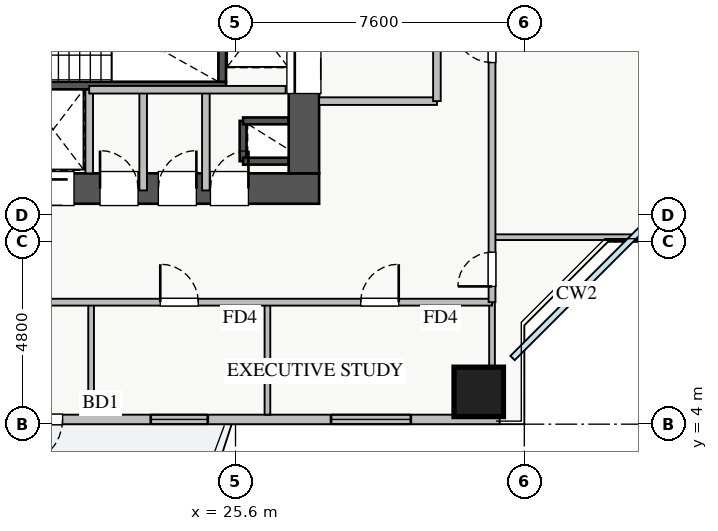
"""IFC4 building model, lengths in metres.
Left out: names, types, materials, properties, quantities, classifications, styles, units other than length and angle.
Written with IfcOpenShell. Run it as: python <this file> out.ifc"""

import sys

from ifc_helpers import new_model, si_unit, direction, frame, frame_2d, origin, origin_2d, place, context, subcontext, project, spatial, rectangle, extrude, source, transform, mapped, element, fill, save


model = new_model("IFC4")
c1 = context("Model", 3, precision=1e-05, world=origin(), true_north=direction((0.0, 1.0)))
c2 = subcontext(c1, "Body", "Model", "MODEL_VIEW")
j1 = project(units=[si_unit("LENGTHUNIT", "METRE"), si_unit("PLANEANGLEUNIT", "RADIAN")], contexts=[c1])
p1 = place(None, origin())
s1 = spatial("IfcSite", under=j1, at=p1, CompositionType="ELEMENT")
p2 = place(p1, origin())
s2 = spatial("IfcBuilding", under=s1, at=p2, CompositionType="ELEMENT")
p3 = place(p2, frame((0.0, 0.0, 42.5)))
s3 = spatial("IfcBuildingStorey", under=s2, at=p3, CompositionType="ELEMENT", Elevation=42.5)
p4 = place(p3, frame((25.8, 10.92, 0.0), z_axis=(0.0, 0.0, 1.0), x_axis=(0.0, 1.0, 0.0)))
e1 = element("IfcWall", 1, at=p4, inside=s3, PredefinedType="SHEAR", context=c2, shape_type="SweptSolid", body=[
    extrude(rectangle(XDim=1.06, YDim=0.18, at=frame_2d((0.53, 0.0))), origin(), (0.0, 0.0, 1.0), 3.03),
])
for number, where, z_axis, x_axis in (
    (2, (25.8, 11.98, 0.0), (0.0, 0.0, 1.0), (1.0, 0.0, 0.0)),
    (3, (25.8, 10.92, 0.0), (0.0, 0.0, 1.0), (1.0, 0.0, 0.0)),
):
    element("IfcWall", number, at=place(p3, frame(where, z_axis=z_axis, x_axis=x_axis)), inside=s3, PredefinedType="SHEAR", context=c2, shape_type="SweptSolid", body=[
        extrude(rectangle(XDim=1.2, YDim=0.18, at=frame_2d((0.6, 0.0))), origin(), (0.0, 0.0, 1.0), 3.03),
    ])
p5 = place(p3, frame((19.88, 12.8, 0.0), z_axis=(0.0, 0.0, 1.0), x_axis=(1.0, 0.0, 0.0)))
e4 = element("IfcWall", 4, at=p5, inside=s3, PredefinedType="SHEAR", context=c2, shape_type="SweptSolid", body=[
    extrude(rectangle(XDim=1.87, YDim=0.18, at=frame_2d((0.935, 0.0))), origin(), (0.0, 0.0, 1.0), 3.03),
])
p6 = place(p3, frame((18.2, 12.91, 0.0), z_axis=(0.0, 0.0, 1.0), x_axis=(1.0, 0.0, 0.0)))
e5 = element("IfcWall", 5, at=p6, inside=s3, PredefinedType="SHEAR", context=c2, shape_type="SweptSolid", body=[
    extrude(rectangle(XDim=7.15, YDim=0.2, at=frame_2d((3.575, 0.0))), origin(), (0.0, 0.0, 1.0), 3.25),
])
p7 = place(p6, frame((0.35, 0.0, 0.0)))
e6 = element("IfcOpeningElement", 6, at=p7, cuts=e5, PredefinedType="OPENING", context=c2, shape_type="SweptSolid", body=[
    extrude(rectangle(XDim=1.1, YDim=2.05, at=frame_2d((0.55, 1.025))), frame((0.0, 0.11, 0.0), z_axis=(0.0, -1.0, 0.0), x_axis=(1.0, 0.0, 0.0)), (0.0, 0.0, 1.0), 0.22),
])
p8 = place(p3, frame((25.25, 13.01, 0.0), z_axis=(0.0, 0.0, 1.0), x_axis=(0.0, 1.0, 0.0)))
e7 = element("IfcWall", 7, at=p8, inside=s3, PredefinedType="SHEAR", context=c2, shape_type="SweptSolid", body=[
    extrude(rectangle(XDim=2.94, YDim=0.2, at=frame_2d((1.47, 0.0))), origin(), (0.0, 0.0, 1.0), 3.25),
])
p9 = place(p3, frame((10.2, 10.2, 0.0), z_axis=(0.0, 0.0, 1.0), x_axis=(1.0, 0.0, 0.0)))
e8 = element("IfcWall", 8, at=p9, inside=s3, PredefinedType="SHEAR", context=c2, shape_type="SweptSolid", body=[
    extrude(rectangle(XDim=17.6, YDim=0.8, at=frame_2d((8.8, 0.0))), origin(), (0.0, 0.0, 1.0), 3.25),
])
p10 = place(p9, frame((1.15, 0.0, 0.0)))
e9 = element("IfcOpeningElement", 9, at=p10, cuts=e8, PredefinedType="OPENING", context=c2, shape_type="SweptSolid", body=[
    extrude(rectangle(XDim=1.1, YDim=2.05, at=frame_2d((0.55, 1.025))), frame((0.0, 0.41, 0.0), z_axis=(0.0, -1.0, 0.0), x_axis=(1.0, 0.0, 0.0)), (0.0, 0.0, 1.0), 0.82),
])
p11 = place(p9, frame((8.3, 0.0, 0.0)))
e10 = element("IfcOpeningElement", 10, at=p11, cuts=e8, PredefinedType="OPENING", context=c2, shape_type="SweptSolid", body=[
    extrude(rectangle(XDim=1.1, YDim=2.05, at=frame_2d((0.55, 1.025))), frame((0.0, 0.41, 0.0), z_axis=(0.0, -1.0, 0.0), x_axis=(1.0, 0.0, 0.0)), (0.0, 0.0, 1.0), 0.82),
])
p12 = place(p9, frame((10.05, 0.0, 0.0)))
e11 = element("IfcOpeningElement", 11, at=p12, cuts=e8, PredefinedType="OPENING", context=c2, shape_type="SweptSolid", body=[
    extrude(rectangle(XDim=1.1, YDim=2.05, at=frame_2d((0.55, 1.025))), frame((0.0, 0.41, 0.0), z_axis=(0.0, -1.0, 0.0), x_axis=(1.0, 0.0, 0.0)), (0.0, 0.0, 1.0), 0.82),
])
p13 = place(p9, frame((14.74, 0.0, 0.0)))
e12 = element("IfcOpeningElement", 12, at=p13, cuts=e8, PredefinedType="OPENING", context=c2, shape_type="SweptSolid", body=[
    extrude(rectangle(XDim=1.0, YDim=2.05, at=frame_2d((0.5, 1.025))), frame((0.0, 0.41, 0.0), z_axis=(0.0, -1.0, 0.0), x_axis=(1.0, 0.0, 0.0)), (0.0, 0.0, 1.0), 0.82),
])
p14 = place(p9, frame((11.835, 0.0, 0.0)))
e13 = element("IfcOpeningElement", 13, at=p14, cuts=e8, PredefinedType="OPENING", context=c2, shape_type="SweptSolid", body=[
    extrude(rectangle(XDim=1.0, YDim=2.05, at=frame_2d((0.5, 1.025))), frame((0.0, 0.41, 0.0), z_axis=(0.0, -1.0, 0.0), x_axis=(1.0, 0.0, 0.0)), (0.0, 0.0, 1.0), 0.82),
])
p15 = place(p9, frame((13.37, 0.0, 0.0)))
e14 = element("IfcOpeningElement", 14, at=p15, cuts=e8, PredefinedType="OPENING", context=c2, shape_type="SweptSolid", body=[
    extrude(rectangle(XDim=1.0, YDim=2.05, at=frame_2d((0.5, 1.025))), frame((0.0, 0.41, 0.0), z_axis=(0.0, -1.0, 0.0), x_axis=(1.0, 0.0, 0.0)), (0.0, 0.0, 1.0), 0.82),
])
p16 = place(p3, frame((27.4, 10.6, 0.0), z_axis=(0.0, 0.0, 1.0), x_axis=(0.0, 1.0, 0.0)))
e15 = element("IfcWall", 15, at=p16, inside=s3, PredefinedType="SHEAR", context=c2, shape_type="SweptSolid", body=[
    extrude(rectangle(XDim=5.6, YDim=0.8, at=frame_2d((2.8, 0.0))), origin(), (0.0, 0.0, 1.0), 3.25),
])
p17 = place(p16, frame((2.1, 0.0, 0.0)))
e16 = element("IfcOpeningElement", 16, at=p17, cuts=e15, PredefinedType="OPENING", context=c2, shape_type="SweptSolid", body=[
    extrude(rectangle(XDim=1.3, YDim=2.05, at=frame_2d((0.65, 1.025))), frame((0.0, 0.41, 0.0), z_axis=(0.0, -1.0, 0.0), x_axis=(1.0, 0.0, 0.0)), (0.0, 0.0, 1.0), 0.82),
])
m1 = source(origin(), c2, "Body", "SweptSolid", [
    extrude(rectangle(XDim=1.3, YDim=1.3, at=origin_2d()), origin(), (0.0, 0.0, 1.0), 3.25),
])
p18 = place(p3, frame((32.0, 4.85, 0.0), z_axis=(0.0, 0.0, 1.0), x_axis=(1.0, 0.0, 0.0)))
e17 = element("IfcColumn", 17, at=p18, inside=s3, PredefinedType="COLUMN", context=c2, shape_type="MappedRepresentation", body=[
    mapped(m1, transform((0.0, 0.0, 0.0), x_axis=(1.0, 0.0, 0.0), y_axis=(0.0, 1.0, 0.0), z_axis=(0.0, 0.0, 1.0), scale=1.0)),
])
p19 = place(p3, frame((5.45, 4.125, 0.0), z_axis=(0.0, 0.0, 1.0), x_axis=(1.0, 0.0, 0.0)))
e18 = element("IfcWall", 18, at=p19, inside=s3, PredefinedType="STANDARD", context=c2, shape_type="SweptSolid", body=[
    extrude(rectangle(XDim=27.1, YDim=0.25, at=frame_2d((13.55, 0.0))), origin(), (0.0, 0.0, 1.0), 2.57),
])
p20 = place(p19, frame((14.4, 0.0, 0.0)))
e19 = element("IfcOpeningElement", 19, at=p20, cuts=e18, PredefinedType="OPENING", context=c2, shape_type="SweptSolid", body=[
    extrude(rectangle(XDim=1.2, YDim=2.1, at=frame_2d((0.6, 1.05))), frame((0.0, 0.135, 0.0), z_axis=(0.0, -1.0, 0.0), x_axis=(1.0, 0.0, 0.0)), (0.0, 0.0, 1.0), 0.27),
])
p21 = place(p19, frame((1.45, 0.0, 0.9)))
e20 = element("IfcOpeningElement", 20, at=p21, cuts=e18, PredefinedType="OPENING", context=c2, shape_type="SweptSolid", body=[
    extrude(rectangle(XDim=1.5, YDim=1.5, at=frame_2d((0.75, 0.75))), frame((0.0, 0.135, 0.0), z_axis=(0.0, -1.0, 0.0), x_axis=(1.0, 0.0, 0.0)), (0.0, 0.0, 1.0), 0.27),
])
p22 = place(p19, frame((9.263, 0.0, 0.9)))
e21 = element("IfcOpeningElement", 21, at=p22, cuts=e18, PredefinedType="OPENING", context=c2, shape_type="SweptSolid", body=[
    extrude(rectangle(XDim=1.8, YDim=1.45, at=frame_2d((0.9, 0.725))), frame((0.0, 0.135, 0.0), z_axis=(0.0, -1.0, 0.0), x_axis=(1.0, 0.0, 0.0)), (0.0, 0.0, 1.0), 0.27),
])
p23 = place(p19, frame((17.92, 0.0, 0.9)))
e22 = element("IfcOpeningElement", 22, at=p23, cuts=e18, PredefinedType="OPENING", context=c2, shape_type="SweptSolid", body=[
    extrude(rectangle(XDim=1.5, YDim=1.5, at=frame_2d((0.75, 0.75))), frame((0.0, 0.135, 0.0), z_axis=(0.0, -1.0, 0.0), x_axis=(1.0, 0.0, 0.0)), (0.0, 0.0, 1.0), 0.27),
])
p24 = place(p19, frame((22.663, 0.0, 0.9)))
e23 = element("IfcOpeningElement", 23, at=p24, cuts=e18, PredefinedType="OPENING", context=c2, shape_type="SweptSolid", body=[
    extrude(rectangle(XDim=2.1, YDim=1.48, at=frame_2d((1.05, 0.74))), frame((0.0, 0.135, 0.0), z_axis=(0.0, -1.0, 0.0), x_axis=(1.0, 0.0, 0.0)), (0.0, 0.0, 1.0), 0.27),
])
p25 = place(p19, frame((4.62, 0.0, 0.9)))
e24 = element("IfcOpeningElement", 24, at=p25, cuts=e18, PredefinedType="OPENING", context=c2, shape_type="SweptSolid", body=[
    extrude(rectangle(XDim=2.4, YDim=1.5, at=frame_2d((1.2, 0.75))), frame((0.0, 0.135, 0.0), z_axis=(0.0, -1.0, 0.0), x_axis=(1.0, 0.0, 0.0)), (0.0, 0.0, 1.0), 0.27),
])
p26 = place(p3, frame((27.8, 12.5, 0.0), z_axis=(0.0, 0.0, 1.0), x_axis=(1.0, 0.0, 0.0)))
e25 = element("IfcWall", 25, at=p26, inside=s3, PredefinedType="PARTITIONING", context=c2, shape_type="SweptSolid", body=[
    extrude(rectangle(XDim=3.1, YDim=0.2, at=frame_2d((1.55, 0.0))), origin(), (0.0, 0.0, 1.0), 3.03),
])
p27 = place(p3, frame((30.9, 12.5, 0.0), z_axis=(0.0, 0.0, 1.0), x_axis=(0.0, 1.0, 0.0)))
e26 = element("IfcWall", 26, at=p27, inside=s3, PredefinedType="PARTITIONING", context=c2, shape_type="SweptSolid", body=[
    extrude(rectangle(XDim=3.9, YDim=0.2, at=frame_2d((1.95, 0.0))), origin(), (0.0, 0.0, 1.0), 3.03),
])
p28 = place(p27, frame((1.4, 0.0, 0.0)))
e27 = element("IfcOpeningElement", 27, at=p28, cuts=e26, PredefinedType="OPENING", context=c2, shape_type="SweptSolid", body=[
    extrude(rectangle(XDim=1.1, YDim=2.05, at=frame_2d((0.55, 1.025))), frame((0.0, 0.11, 0.0), z_axis=(0.0, -1.0, 0.0), x_axis=(1.0, 0.0, 0.0)), (0.0, 0.0, 1.0), 0.22),
])
p29 = place(p3, frame((24.82, 10.15, 0.0), z_axis=(0.0, 0.0, 1.0), x_axis=(0.0, 1.0, 0.0)))
e28 = element("IfcWall", 28, at=p29, inside=s3, PredefinedType="PARTITIONING", context=c2, shape_type="SweptSolid", body=[
    extrude(rectangle(XDim=2.65, YDim=0.2, at=frame_2d((1.325, 0.0))), origin(), (0.0, 0.0, 1.0), 3.03),
])
p30 = place(p3, frame((21.75, 10.6, 0.0), z_axis=(0.0, 0.0, 1.0), x_axis=(0.0, 1.0, 0.0)))
e29 = element("IfcWall", 29, at=p30, inside=s3, PredefinedType="PARTITIONING", context=c2, shape_type="SweptSolid", body=[
    extrude(rectangle(XDim=2.2, YDim=0.2, at=frame_2d((1.1, 0.0))), origin(), (0.0, 0.0, 1.0), 3.03),
])
p31 = place(p3, frame((23.17, 10.15, 0.0), z_axis=(0.0, 0.0, 1.0), x_axis=(0.0, 1.0, 0.0)))
e30 = element("IfcWall", 30, at=p31, inside=s3, PredefinedType="PARTITIONING", context=c2, shape_type="SweptSolid", body=[
    extrude(rectangle(XDim=2.65, YDim=0.2, at=frame_2d((1.325, 0.0))), origin(), (0.0, 0.0, 1.0), 3.03),
])
p32 = place(p3, frame((21.75, 12.8, 0.0), z_axis=(0.0, 0.0, 1.0), x_axis=(1.0, 0.0, 0.0)))
e31 = element("IfcWall", 31, at=p32, inside=s3, PredefinedType="PARTITIONING", context=c2, shape_type="SweptSolid", body=[
    extrude(rectangle(XDim=5.17, YDim=0.2, at=frame_2d((2.585, 0.0))), origin(), (0.0, 0.0, 1.0), 3.03),
])
for number, where, z_axis, x_axis in (
    (32, (21.8, 4.25, 0.0), (0.0, 0.0, 1.0), (0.0, 1.0, 0.0)),
    (33, (26.44, 4.25, 0.0), (0.0, 0.0, 1.0), (0.0, 1.0, 0.0)),
    (34, (32.35, 4.25, 0.0), (0.0, 0.0, 1.0), (0.0, 1.0, 0.0)),
):
    element("IfcWall", number, at=place(p3, frame(where, z_axis=z_axis, x_axis=x_axis)), inside=s3, PredefinedType="PARTITIONING", context=c2, shape_type="SweptSolid", body=[
        extrude(rectangle(XDim=2.96, YDim=0.15, at=frame_2d((1.48, 0.0))), origin(), (0.0, 0.0, 1.0), 3.03),
    ])
p33 = place(p3, frame((8.72, 7.21, 0.0), z_axis=(0.0, 0.0, 1.0), x_axis=(1.0, 0.0, 0.0)))
e35 = element("IfcWall", 35, at=p33, inside=s3, PredefinedType="PARTITIONING", context=c2, shape_type="SweptSolid", body=[
    extrude(rectangle(XDim=23.63, YDim=0.18, at=frame_2d((11.815, 0.0))), origin(), (0.0, 0.0, 1.0), 3.03),
])
p34 = place(p33, frame((2.05, 0.0, 0.0)))
e36 = element("IfcOpeningElement", 36, at=p34, cuts=e35, PredefinedType="OPENING", context=c2, shape_type="SweptSolid", body=[
    extrude(rectangle(XDim=1.0, YDim=2.05, at=frame_2d((0.5, 1.025))), frame((0.0, 0.1, 0.0), z_axis=(0.0, -1.0, 0.0), x_axis=(1.0, 0.0, 0.0)), (0.0, 0.0, 1.0), 0.2),
])
p35 = place(p33, frame((8.59, 0.0, 0.0)))
e37 = element("IfcOpeningElement", 37, at=p35, cuts=e35, PredefinedType="OPENING", context=c2, shape_type="SweptSolid", body=[
    extrude(rectangle(XDim=1.0, YDim=2.05, at=frame_2d((0.5, 1.025))), frame((0.0, 0.1, 0.0), z_axis=(0.0, -1.0, 0.0), x_axis=(1.0, 0.0, 0.0)), (0.0, 0.0, 1.0), 0.2),
])
p36 = place(p33, frame((14.9, 0.0, 0.0)))
e38 = element("IfcOpeningElement", 38, at=p36, cuts=e35, PredefinedType="OPENING", context=c2, shape_type="SweptSolid", body=[
    extrude(rectangle(XDim=1.0, YDim=2.05, at=frame_2d((0.5, 1.025))), frame((0.0, 0.1, 0.0), z_axis=(0.0, -1.0, 0.0), x_axis=(1.0, 0.0, 0.0)), (0.0, 0.0, 1.0), 0.2),
])
p37 = place(p33, frame((20.175, 0.0, 0.0)))
e39 = element("IfcOpeningElement", 39, at=p37, cuts=e35, PredefinedType="OPENING", context=c2, shape_type="SweptSolid", body=[
    extrude(rectangle(XDim=1.0, YDim=2.05, at=frame_2d((0.5, 1.025))), frame((0.0, 0.1, 0.0), z_axis=(0.0, -1.0, 0.0), x_axis=(1.0, 0.0, 0.0)), (0.0, 0.0, 1.0), 0.2),
])
p38 = place(p3, frame((32.35, 8.92, 0.0), z_axis=(0.0, 0.0, 1.0), x_axis=(1.0, 0.0, 0.0)))
e40 = element("IfcWall", 40, at=p38, inside=s3, PredefinedType="PARTITIONING", context=c2, shape_type="SweptSolid", body=[
    extrude(rectangle(XDim=5.4, YDim=0.15, at=frame_2d((2.7, 0.0))), origin(), (0.0, 0.0, 1.0), 3.03),
])
p39 = place(p3, frame((32.35, 7.21, 0.0), z_axis=(0.0, 0.0, 1.0), x_axis=(0.0, 1.0, 0.0)))
e41 = element("IfcWall", 41, at=p39, inside=s3, PredefinedType="PARTITIONING", context=c2, shape_type="SweptSolid", body=[
    extrude(rectangle(XDim=31.23, YDim=0.18, at=frame_2d((15.615, 0.0))), origin(), (0.0, 0.0, 1.0), 2.825),
])
p40 = place(p39, frame((30.09, 0.0, 0.0)))
e42 = element("IfcOpeningElement", 42, at=p40, cuts=e41, PredefinedType="OPENING", context=c2, shape_type="SweptSolid", body=[
    extrude(rectangle(XDim=0.9, YDim=2.05, at=frame_2d((0.45, 1.025))), frame((0.0, 0.1, 0.0), z_axis=(0.0, -1.0, 0.0), x_axis=(1.0, 0.0, 0.0)), (0.0, 0.0, 1.0), 0.2),
])
p41 = place(p39, frame((0.415, 0.0, 0.0)))
e43 = element("IfcOpeningElement", 43, at=p41, cuts=e41, PredefinedType="OPENING", context=c2, shape_type="SweptSolid", body=[
    extrude(rectangle(XDim=0.9, YDim=2.05, at=frame_2d((0.45, 1.025))), frame((0.0, 0.1, 0.0), z_axis=(0.0, -1.0, 0.0), x_axis=(1.0, 0.0, 0.0)), (0.0, 0.0, 1.0), 0.2),
])
p42 = place(p39, frame((6.305, 0.0, 0.0)))
e44 = element("IfcOpeningElement", 44, at=p42, cuts=e41, PredefinedType="OPENING", context=c2, shape_type="SweptSolid", body=[
    extrude(rectangle(XDim=1.0, YDim=2.05, at=frame_2d((0.5, 1.025))), frame((0.0, 0.1, 0.0), z_axis=(0.0, -1.0, 0.0), x_axis=(1.0, 0.0, 0.0)), (0.0, 0.0, 1.0), 0.2),
])
p43 = place(p39, frame((13.205, 0.0, 0.0)))
e45 = element("IfcOpeningElement", 45, at=p43, cuts=e41, PredefinedType="OPENING", context=c2, shape_type="SweptSolid", body=[
    extrude(rectangle(XDim=1.0, YDim=2.05, at=frame_2d((0.5, 1.025))), frame((0.0, 0.1, 0.0), z_axis=(0.0, -1.0, 0.0), x_axis=(1.0, 0.0, 0.0)), (0.0, 0.0, 1.0), 0.2),
])
p44 = place(p39, frame((22.5, 0.0, 0.0)))
e46 = element("IfcOpeningElement", 46, at=p44, cuts=e41, PredefinedType="OPENING", context=c2, shape_type="SweptSolid", body=[
    extrude(rectangle(XDim=1.0, YDim=2.05, at=frame_2d((0.5, 1.025))), frame((0.0, 0.1, 0.0), z_axis=(0.0, -1.0, 0.0), x_axis=(1.0, 0.0, 0.0)), (0.0, 0.0, 1.0), 0.2),
])
m2 = source(origin(), c2, "Body", "SweptSolid", [
    extrude(rectangle(XDim=1.2, YDim=2.1, at=frame_2d((0.6, 1.05))), frame((0.0, 0.025, 0.0), z_axis=(0.0, -1.0, 0.0), x_axis=(1.0, 0.0, 0.0)), (0.0, 0.0, 1.0), 0.05),
])
p45 = place(p20, frame((1.2, 0.0, 0.0), z_axis=(0.0, 0.0, 1.0), x_axis=(-1.0, 0.0, 0.0)))
e47 = element("IfcDoor", 47, at=p45, inside=s3, OperationType="SINGLE_SWING_LEFT", PredefinedType="DOOR", context=c2, shape_type="MappedRepresentation", body=[
    mapped(m2, transform((0.0, 0.0, 0.0), x_axis=(1.0, 0.0, 0.0), y_axis=(0.0, 1.0, 0.0), z_axis=(0.0, 0.0, 1.0), scale=1.0)),
])
fill(e19, e47)
m3 = source(origin(), c2, "Body", "SweptSolid", [
    extrude(rectangle(XDim=1.5, YDim=1.5, at=frame_2d((0.75, 0.75))), frame((0.0, 0.03, 0.0), z_axis=(0.0, -1.0, 0.0), x_axis=(1.0, 0.0, 0.0)), (0.0, 0.0, 1.0), 0.06),
])
p46 = place(p23, origin())
e48 = element("IfcWindow", 48, at=p46, inside=s3, PartitioningType="DOUBLE_PANEL_VERTICAL", PredefinedType="WINDOW", context=c2, shape_type="MappedRepresentation", body=[
    mapped(m3, transform((0.0, 0.0, 0.0), x_axis=(1.0, 0.0, 0.0), y_axis=(0.0, 1.0, 0.0), z_axis=(0.0, 0.0, 1.0), scale=1.0)),
])
fill(e22, e48)
m4 = source(origin(), c2, "Body", "SweptSolid", [
    extrude(rectangle(XDim=2.1, YDim=1.48, at=frame_2d((1.05, 0.74))), frame((0.0, 0.03, 0.0), z_axis=(0.0, -1.0, 0.0), x_axis=(1.0, 0.0, 0.0)), (0.0, 0.0, 1.0), 0.06),
])
p47 = place(p24, origin())
e49 = element("IfcWindow", 49, at=p47, inside=s3, PartitioningType="TRIPLE_PANEL_VERTICAL", PredefinedType="WINDOW", context=c2, shape_type="MappedRepresentation", body=[
    mapped(m4, transform((0.0, 0.0, 0.0), x_axis=(1.0, 0.0, 0.0), y_axis=(0.0, 1.0, 0.0), z_axis=(0.0, 0.0, 1.0), scale=1.0)),
])
fill(e23, e49)
m5 = source(origin(), c2, "Body", "SweptSolid", [
    extrude(rectangle(XDim=1.3, YDim=2.05, at=frame_2d((0.65, 1.025))), frame((0.0, 0.025, 0.0), z_axis=(0.0, -1.0, 0.0), x_axis=(1.0, 0.0, 0.0)), (0.0, 0.0, 1.0), 0.05),
])
p48 = place(p17, origin())
e50 = element("IfcDoor", 50, at=p48, inside=s3, OperationType="SLIDING_TO_RIGHT", PredefinedType="DOOR", context=c2, shape_type="MappedRepresentation", body=[
    mapped(m5, transform((0.0, 0.0, 0.0), x_axis=(1.0, 0.0, 0.0), y_axis=(0.0, 1.0, 0.0), z_axis=(0.0, 0.0, 1.0), scale=1.0)),
])
fill(e16, e50)
m6 = source(origin(), c2, "Body", "SweptSolid", [
    extrude(rectangle(XDim=1.1, YDim=2.05, at=frame_2d((0.55, 1.025))), frame((0.0, 0.025, 0.0), z_axis=(0.0, -1.0, 0.0), x_axis=(1.0, 0.0, 0.0)), (0.0, 0.0, 1.0), 0.05),
])
p49 = place(p12, origin())
e51 = element("IfcDoor", 51, at=p49, inside=s3, OperationType="SLIDING_TO_RIGHT", PredefinedType="DOOR", context=c2, shape_type="MappedRepresentation", body=[
    mapped(m6, transform((0.0, 0.0, 0.0), x_axis=(1.0, 0.0, 0.0), y_axis=(0.0, 1.0, 0.0), z_axis=(0.0, 0.0, 1.0), scale=1.0)),
])
fill(e11, e51)
m7 = source(origin(), c2, "Body", "SweptSolid", [
    extrude(rectangle(XDim=1.0, YDim=2.05, at=frame_2d((0.5, 1.025))), frame((0.0, 0.025, 0.0), z_axis=(0.0, -1.0, 0.0), x_axis=(1.0, 0.0, 0.0)), (0.0, 0.0, 1.0), 0.05),
])
p50 = place(p13, origin())
e52 = element("IfcDoor", 52, at=p50, inside=s3, OperationType="SINGLE_SWING_RIGHT", PredefinedType="DOOR", context=c2, shape_type="MappedRepresentation", body=[
    mapped(m7, transform((0.0, 0.0, 0.0), x_axis=(1.0, 0.0, 0.0), y_axis=(0.0, 1.0, 0.0), z_axis=(0.0, 0.0, 1.0), scale=1.0)),
])
fill(e12, e52)
p51 = place(p14, origin())
e53 = element("IfcDoor", 53, at=p51, inside=s3, OperationType="SINGLE_SWING_LEFT", PredefinedType="DOOR", context=c2, shape_type="MappedRepresentation", body=[
    mapped(m7, transform((0.0, 0.0, 0.0), x_axis=(1.0, 0.0, 0.0), y_axis=(0.0, 1.0, 0.0), z_axis=(0.0, 0.0, 1.0), scale=1.0)),
])
fill(e13, e53)
p52 = place(p15, origin())
e54 = element("IfcDoor", 54, at=p52, inside=s3, OperationType="SINGLE_SWING_RIGHT", PredefinedType="DOOR", context=c2, shape_type="MappedRepresentation", body=[
    mapped(m7, transform((0.0, 0.0, 0.0), x_axis=(1.0, 0.0, 0.0), y_axis=(0.0, 1.0, 0.0), z_axis=(0.0, 0.0, 1.0), scale=1.0)),
])
fill(e14, e54)
p53 = place(p36, origin())
e55 = element("IfcDoor", 55, at=p53, inside=s3, OperationType="SINGLE_SWING_LEFT", PredefinedType="DOOR", context=c2, shape_type="MappedRepresentation", body=[
    mapped(m7, transform((0.0, 0.0, 0.0), x_axis=(1.0, 0.0, 0.0), y_axis=(0.0, 1.0, 0.0), z_axis=(0.0, 0.0, 1.0), scale=1.0)),
])
fill(e38, e55)
p54 = place(p37, origin())
e56 = element("IfcDoor", 56, at=p54, inside=s3, OperationType="SINGLE_SWING_RIGHT", PredefinedType="DOOR", context=c2, shape_type="MappedRepresentation", body=[
    mapped(m7, transform((0.0, 0.0, 0.0), x_axis=(1.0, 0.0, 0.0), y_axis=(0.0, 1.0, 0.0), z_axis=(0.0, 0.0, 1.0), scale=1.0)),
])
fill(e39, e56)
m8 = source(origin(), c2, "Body", "SweptSolid", [
    extrude(rectangle(XDim=0.9, YDim=2.05, at=frame_2d((0.45, 1.025))), frame((0.0, 0.025, 0.0), z_axis=(0.0, -1.0, 0.0), x_axis=(1.0, 0.0, 0.0)), (0.0, 0.0, 1.0), 0.05),
])
p55 = place(p41, origin())
e57 = element("IfcDoor", 57, at=p55, inside=s3, OperationType="SINGLE_SWING_LEFT", PredefinedType="DOOR", context=c2, shape_type="MappedRepresentation", body=[
    mapped(m8, transform((0.0, 0.0, 0.0), x_axis=(1.0, 0.0, 0.0), y_axis=(0.0, 1.0, 0.0), z_axis=(0.0, 0.0, 1.0), scale=1.0)),
])
fill(e43, e57)
p56 = place(p42, origin())
e58 = element("IfcDoor", 58, at=p56, inside=s3, OperationType="SINGLE_SWING_RIGHT", PredefinedType="DOOR", context=c2, shape_type="MappedRepresentation", body=[
    mapped(m7, transform((0.0, 0.0, 0.0), x_axis=(1.0, 0.0, 0.0), y_axis=(0.0, 1.0, 0.0), z_axis=(0.0, 0.0, 1.0), scale=1.0)),
])
fill(e44, e58)
save(model, sys.argv[1])
